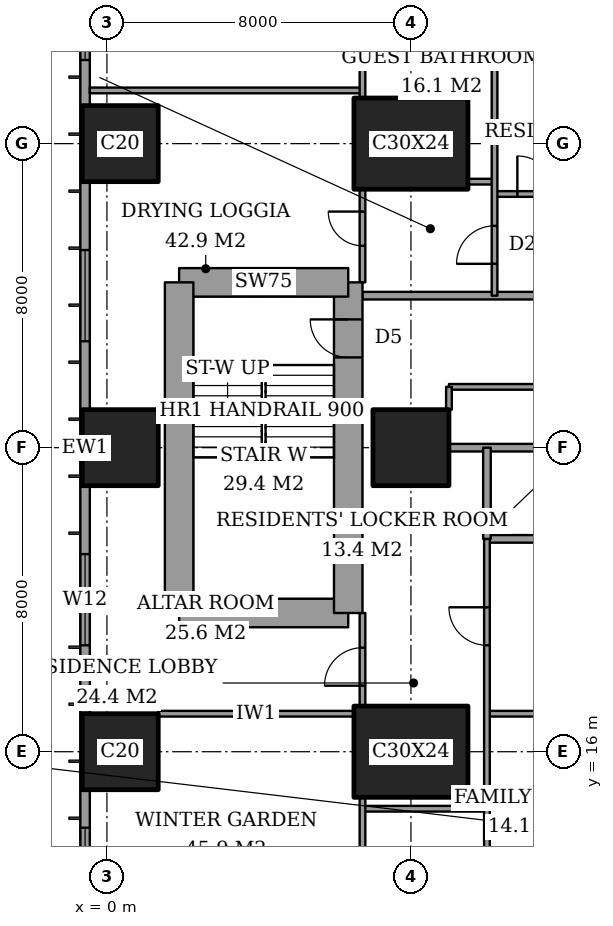
"""IFC4 building model, lengths in metres.
Left out: names, types, materials, properties, quantities, classifications, styles, units other than length and angle.
Written with IfcOpenShell. Run it as: python <this file> out.ifc"""

import sys

from ifc_helpers import new_model, si_unit, direction, frame, frame_2d, origin, origin_2d, place, context, subcontext, project, spatial, rectangle, extrude, element, fill, save


model = new_model("IFC4")
c1 = context("Model", 3, precision=1e-05, world=origin(), true_north=direction((0.0, 1.0)))
c2 = subcontext(c1, "Body", "Model", "MODEL_VIEW")
j1 = project(units=[si_unit("LENGTHUNIT", "METRE"), si_unit("PLANEANGLEUNIT", "RADIAN")], contexts=[c1])
p1 = place(None, origin())
s1 = spatial("IfcSite", under=j1, at=p1, CompositionType="ELEMENT")
p2 = place(p1, origin())
s2 = spatial("IfcBuilding", under=s1, at=p2, CompositionType="ELEMENT")
p3 = place(p2, frame((0.0, 0.0, 117.8)))
s3 = spatial("IfcBuildingStorey", under=s2, at=p3, CompositionType="ELEMENT", Elevation=117.8)
for number, where, z_axis, x_axis in (
    (1, (0.35, 16.0, 0.0), (0.0, 0.0, 1.0), (1.0, 0.0, 0.0)),
    (2, (0.35, 24.0, 0.0), (0.0, 0.0, 1.0), (1.0, 0.0, 0.0)),
    (3, (0.35, 32.0, 0.0), (0.0, 0.0, 1.0), (1.0, 0.0, 0.0)),
):
    element("IfcColumn", number, at=place(p3, frame(where, z_axis=z_axis, x_axis=x_axis)), inside=s3, PredefinedType="COLUMN", context=c2, shape_type="SweptSolid", body=[
        extrude(rectangle(XDim=2.0, YDim=2.0, at=origin_2d()), origin(), (0.0, 0.0, 1.0), 3.6),
    ])
p4 = place(p3, frame((8.0, 16.0, 0.0), z_axis=(0.0, 0.0, 1.0), x_axis=(1.0, 0.0, 0.0)))
e4 = element("IfcColumn", 4, at=p4, inside=s3, PredefinedType="COLUMN", context=c2, shape_type="SweptSolid", body=[
    extrude(rectangle(XDim=3.0, YDim=2.4, at=origin_2d()), origin(), (0.0, 0.0, 1.0), 3.6),
])
p5 = place(p3, frame((8.0, 24.0, 0.0), z_axis=(0.0, 0.0, 1.0), x_axis=(1.0, 0.0, 0.0)))
e5 = element("IfcColumn", 5, at=p5, inside=s3, PredefinedType="COLUMN", context=c2, shape_type="SweptSolid", body=[
    extrude(rectangle(XDim=2.0, YDim=2.0, at=origin_2d()), origin(), (0.0, 0.0, 1.0), 3.6),
])
p6 = place(p3, frame((8.0, 32.0, 0.0), z_axis=(0.0, 0.0, 1.0), x_axis=(1.0, 0.0, 0.0)))
e6 = element("IfcColumn", 6, at=p6, inside=s3, PredefinedType="COLUMN", context=c2, shape_type="SweptSolid", body=[
    extrude(rectangle(XDim=3.0, YDim=2.4, at=origin_2d()), origin(), (0.0, 0.0, 1.0), 3.6),
])
p7 = place(p3, frame((1.9, 19.65, 0.0), z_axis=(0.0, 0.0, 1.0), x_axis=(1.0, 0.0, 0.0)))
e7 = element("IfcWall", 7, at=p7, inside=s3, PredefinedType="SHEAR", context=c2, shape_type="SweptSolid", body=[
    extrude(rectangle(XDim=4.45, YDim=0.75, at=frame_2d((2.225, 0.0))), origin(), (0.0, 0.0, 1.0), 3.6),
])
p8 = place(p3, frame((6.35, 19.65, 0.0), z_axis=(0.0, 0.0, 1.0), x_axis=(0.0, 1.0, 0.0)))
e8 = element("IfcWall", 8, at=p8, inside=s3, PredefinedType="SHEAR", context=c2, shape_type="SweptSolid", body=[
    extrude(rectangle(XDim=8.7, YDim=0.75, at=frame_2d((4.35, 0.0))), origin(), (0.0, 0.0, 1.0), 3.6),
])
p9 = place(p8, frame((6.725, 0.0, 0.0)))
e9 = element("IfcOpeningElement", 9, at=p9, cuts=e8, PredefinedType="OPENING", context=c2, shape_type="SweptSolid", body=[
    extrude(rectangle(XDim=1.0, YDim=2.1, at=frame_2d((0.5, 1.05))), frame((0.0, 0.385, 0.0), z_axis=(0.0, -1.0, 0.0), x_axis=(1.0, 0.0, 0.0)), (0.0, 0.0, 1.0), 0.77),
])
p10 = place(p3, frame((6.35, 28.35, 0.0), z_axis=(0.0, 0.0, 1.0), x_axis=(-1.0, 0.0, 0.0)))
e10 = element("IfcWall", 10, at=p10, inside=s3, PredefinedType="SHEAR", context=c2, shape_type="SweptSolid", body=[
    extrude(rectangle(XDim=4.45, YDim=0.75, at=frame_2d((2.225, 0.0))), origin(), (0.0, 0.0, 1.0), 3.6),
])
p11 = place(p3, frame((1.9, 28.35, 0.0), z_axis=(0.0, 0.0, 1.0), x_axis=(0.0, -1.0, 0.0)))
e11 = element("IfcWall", 11, at=p11, inside=s3, PredefinedType="SHEAR", context=c2, shape_type="SweptSolid", body=[
    extrude(rectangle(XDim=8.7, YDim=0.75, at=frame_2d((4.35, 0.0))), origin(), (0.0, 0.0, 1.0), 3.6),
])
p12 = place(p3, frame((-0.575, 44.825, 0.0), z_axis=(0.0, 0.0, 1.0), x_axis=(0.0, -1.0, 0.0)))
e12 = element("IfcWall", 12, at=p12, inside=s3, PredefinedType="SOLIDWALL", context=c2, shape_type="SweptSolid", body=[
    extrude(rectangle(XDim=41.65, YDim=0.25, at=frame_2d((20.825, 0.0))), origin(), (0.0, 0.0, 1.0), 3.6),
])
p13 = place(p12, frame((0.775, 0.0, 0.4)))
e13 = element("IfcOpeningElement", 13, at=p13, cuts=e12, PredefinedType="OPENING", context=c2, shape_type="SweptSolid", body=[
    extrude(rectangle(XDim=2.4, YDim=2.2, at=frame_2d((1.2, 1.1))), frame((0.0, 0.135, 0.0), z_axis=(0.0, -1.0, 0.0), x_axis=(1.0, 0.0, 0.0)), (0.0, 0.0, 1.0), 0.27),
])
p14 = place(p12, frame((6.1, 0.0, 0.4)))
e14 = element("IfcOpeningElement", 14, at=p14, cuts=e12, PredefinedType="OPENING", context=c2, shape_type="SweptSolid", body=[
    extrude(rectangle(XDim=1.2, YDim=2.2, at=frame_2d((0.6, 1.1))), frame((0.0, 0.135, 0.0), z_axis=(0.0, -1.0, 0.0), x_axis=(1.0, 0.0, 0.0)), (0.0, 0.0, 1.0), 0.27),
])
p15 = place(p12, frame((8.225, 0.0, 0.4)))
e15 = element("IfcOpeningElement", 15, at=p15, cuts=e12, PredefinedType="OPENING", context=c2, shape_type="SweptSolid", body=[
    extrude(rectangle(XDim=2.4, YDim=2.2, at=frame_2d((1.2, 1.1))), frame((0.0, 0.135, 0.0), z_axis=(0.0, -1.0, 0.0), x_axis=(1.0, 0.0, 0.0)), (0.0, 0.0, 1.0), 0.27),
])
p16 = place(p12, frame((15.625, 0.0, 0.4)))
e16 = element("IfcOpeningElement", 16, at=p16, cuts=e12, PredefinedType="OPENING", context=c2, shape_type="SweptSolid", body=[
    extrude(rectangle(XDim=2.4, YDim=2.2, at=frame_2d((1.2, 1.1))), frame((0.0, 0.135, 0.0), z_axis=(0.0, -1.0, 0.0), x_axis=(1.0, 0.0, 0.0)), (0.0, 0.0, 1.0), 0.27),
])
p17 = place(p12, frame((23.625, 0.0, 0.4)))
e17 = element("IfcOpeningElement", 17, at=p17, cuts=e12, PredefinedType="OPENING", context=c2, shape_type="SweptSolid", body=[
    extrude(rectangle(XDim=2.4, YDim=2.2, at=frame_2d((1.2, 1.1))), frame((0.0, 0.135, 0.0), z_axis=(0.0, -1.0, 0.0), x_axis=(1.0, 0.0, 0.0)), (0.0, 0.0, 1.0), 0.27),
])
p18 = place(p12, frame((30.825, 0.0, 0.4)))
e18 = element("IfcOpeningElement", 18, at=p18, cuts=e12, PredefinedType="OPENING", context=c2, shape_type="SweptSolid", body=[
    extrude(rectangle(XDim=2.4, YDim=2.2, at=frame_2d((1.2, 1.1))), frame((0.0, 0.135, 0.0), z_axis=(0.0, -1.0, 0.0), x_axis=(1.0, 0.0, 0.0)), (0.0, 0.0, 1.0), 0.27),
])
p19 = place(p12, frame((34.5, 0.0, 0.4)))
e19 = element("IfcOpeningElement", 19, at=p19, cuts=e12, PredefinedType="OPENING", context=c2, shape_type="SweptSolid", body=[
    extrude(rectangle(XDim=1.2, YDim=2.2, at=frame_2d((0.6, 1.1))), frame((0.0, 0.135, 0.0), z_axis=(0.0, -1.0, 0.0), x_axis=(1.0, 0.0, 0.0)), (0.0, 0.0, 1.0), 0.27),
])
p20 = place(p12, frame((38.475, 0.0, 0.4)))
e20 = element("IfcOpeningElement", 20, at=p20, cuts=e12, PredefinedType="OPENING", context=c2, shape_type="SweptSolid", body=[
    extrude(rectangle(XDim=2.4, YDim=2.2, at=frame_2d((1.2, 1.1))), frame((0.0, 0.135, 0.0), z_axis=(0.0, -1.0, 0.0), x_axis=(1.0, 0.0, 0.0)), (0.0, 0.0, 1.0), 0.27),
])
p21 = place(p3, frame((6.725, 14.5, 0.0), z_axis=(0.0, 0.0, 1.0), x_axis=(1.0, 0.0, 0.0)))
e21 = element("IfcWall", 21, at=p21, inside=s3, PredefinedType="PARTITIONING", context=c2, shape_type="SweptSolid", body=[
    extrude(rectangle(XDim=3.275, YDim=0.15, at=frame_2d((1.637, 0.0))), origin(), (0.0, 0.0, 1.0), 3.35),
])
p22 = place(p3, frame((1.35, 17.0, 0.0), z_axis=(0.0, 0.0, 1.0), x_axis=(1.0, 0.0, 0.0)))
e22 = element("IfcWall", 22, at=p22, inside=s3, PredefinedType="PARTITIONING", context=c2, shape_type="SweptSolid", body=[
    extrude(rectangle(XDim=5.15, YDim=0.15, at=frame_2d((2.575, 0.0))), origin(), (0.0, 0.0, 1.0), 3.35),
])
p23 = place(p3, frame((10.0, 17.0, 0.0), z_axis=(0.0, 0.0, 1.0), x_axis=(1.0, 0.0, 0.0)))
e23 = element("IfcWall", 23, at=p23, inside=s3, PredefinedType="PARTITIONING", context=c2, shape_type="SweptSolid", body=[
    extrude(rectangle(XDim=4.4, YDim=0.15, at=frame_2d((2.2, 0.0))), origin(), (0.0, 0.0, 1.0), 3.35),
])
p24 = place(p23, frame((2.8, 0.0, 0.0)))
e24 = element("IfcOpeningElement", 24, at=p24, cuts=e23, PredefinedType="OPENING", context=c2, shape_type="SweptSolid", body=[
    extrude(rectangle(XDim=1.0, YDim=2.1, at=frame_2d((0.5, 1.05))), frame((0.0, 0.085, 0.0), z_axis=(0.0, -1.0, 0.0), x_axis=(1.0, 0.0, 0.0)), (0.0, 0.0, 1.0), 0.17),
])
p25 = place(p3, frame((10.0, 21.6, 0.0), z_axis=(0.0, 0.0, 1.0), x_axis=(1.0, 0.0, 0.0)))
e25 = element("IfcWall", 25, at=p25, inside=s3, PredefinedType="PARTITIONING", context=c2, shape_type="SweptSolid", body=[
    extrude(rectangle(XDim=4.8, YDim=0.2, at=frame_2d((2.4, 0.0))), origin(), (0.0, 0.0, 1.0), 3.35),
])
p26 = place(p25, frame((1.95, 0.0, 0.0)))
e26 = element("IfcOpeningElement", 26, at=p26, cuts=e25, PredefinedType="OPENING", context=c2, shape_type="SweptSolid", body=[
    extrude(rectangle(XDim=0.9, YDim=2.1, at=frame_2d((0.45, 1.05))), frame((0.0, 0.11, 0.0), z_axis=(0.0, -1.0, 0.0), x_axis=(1.0, 0.0, 0.0)), (0.0, 0.0, 1.0), 0.22),
])
p27 = place(p3, frame((9.0, 24.0, 0.0), z_axis=(0.0, 0.0, 1.0), x_axis=(1.0, 0.0, 0.0)))
e27 = element("IfcWall", 27, at=p27, inside=s3, PredefinedType="PARTITIONING", context=c2, shape_type="SweptSolid", body=[
    extrude(rectangle(XDim=6.0, YDim=0.2, at=frame_2d((3.0, 0.0))), origin(), (0.0, 0.0, 1.0), 3.35),
])
p28 = place(p3, frame((9.0, 25.6, 0.0), z_axis=(0.0, 0.0, 1.0), x_axis=(1.0, 0.0, 0.0)))
e28 = element("IfcWall", 28, at=p28, inside=s3, PredefinedType="PARTITIONING", context=c2, shape_type="SweptSolid", body=[
    extrude(rectangle(XDim=8.4, YDim=0.15, at=frame_2d((4.2, 0.0))), origin(), (0.0, 0.0, 1.0), 3.35),
])
p29 = place(p28, frame((3.75, 0.0, 0.0)))
e29 = element("IfcOpeningElement", 29, at=p29, cuts=e28, PredefinedType="OPENING", context=c2, shape_type="SweptSolid", body=[
    extrude(rectangle(XDim=0.9, YDim=2.1, at=frame_2d((0.45, 1.05))), frame((0.0, 0.085, 0.0), z_axis=(0.0, -1.0, 0.0), x_axis=(1.0, 0.0, 0.0)), (0.0, 0.0, 1.0), 0.17),
])
p30 = place(p3, frame((6.725, 28.0, 0.0), z_axis=(0.0, 0.0, 1.0), x_axis=(1.0, 0.0, 0.0)))
e30 = element("IfcWall", 30, at=p30, inside=s3, PredefinedType="PARTITIONING", context=c2, shape_type="SweptSolid", body=[
    extrude(rectangle(XDim=17.275, YDim=0.2, at=frame_2d((8.637, 0.0))), origin(), (0.0, 0.0, 1.0), 3.35),
])
p31 = place(p30, frame((6.775, 0.0, 0.0)))
e31 = element("IfcOpeningElement", 31, at=p31, cuts=e30, PredefinedType="OPENING", context=c2, shape_type="SweptSolid", body=[
    extrude(rectangle(XDim=1.2, YDim=2.4, at=frame_2d((0.6, 1.2))), frame((0.0, 0.11, 0.0), z_axis=(0.0, -1.0, 0.0), x_axis=(1.0, 0.0, 0.0)), (0.0, 0.0, 1.0), 0.22),
])
p32 = place(p3, frame((10.2, 30.675, 0.0), z_axis=(0.0, 0.0, 1.0), x_axis=(1.0, 0.0, 0.0)))
e32 = element("IfcWall", 32, at=p32, inside=s3, PredefinedType="PARTITIONING", context=c2, shape_type="SweptSolid", body=[
    extrude(rectangle(XDim=4.2, YDim=0.15, at=frame_2d((2.1, 0.0))), origin(), (0.0, 0.0, 1.0), 3.35),
])
p33 = place(p32, frame((0.6, 0.0, 0.0)))
e33 = element("IfcOpeningElement", 33, at=p33, cuts=e32, PredefinedType="OPENING", context=c2, shape_type="SweptSolid", body=[
    extrude(rectangle(XDim=1.0, YDim=2.1, at=frame_2d((0.5, 1.05))), frame((0.0, 0.085, 0.0), z_axis=(0.0, -1.0, 0.0), x_axis=(1.0, 0.0, 0.0)), (0.0, 0.0, 1.0), 0.17),
])
p34 = place(p3, frame((9.5, 31.0, 0.0), z_axis=(0.0, 0.0, 1.0), x_axis=(1.0, 0.0, 0.0)))
e34 = element("IfcWall", 34, at=p34, inside=s3, PredefinedType="PARTITIONING", context=c2, shape_type="SweptSolid", body=[
    extrude(rectangle(XDim=0.7, YDim=0.15, at=frame_2d((0.35, 0.0))), origin(), (0.0, 0.0, 1.0), 3.35),
])
p35 = place(p3, frame((-0.45, 33.4, 0.0), z_axis=(0.0, 0.0, 1.0), x_axis=(1.0, 0.0, 0.0)))
e35 = element("IfcWall", 35, at=p35, inside=s3, PredefinedType="PARTITIONING", context=c2, shape_type="SweptSolid", body=[
    extrude(rectangle(XDim=7.175, YDim=0.15, at=frame_2d((3.587, 0.0))), origin(), (0.0, 0.0, 1.0), 3.35),
])
p36 = place(p3, frame((6.725, 10.6, 0.0), z_axis=(0.0, 0.0, 1.0), x_axis=(0.0, 1.0, 0.0)))
e36 = element("IfcWall", 36, at=p36, inside=s3, PredefinedType="PARTITIONING", context=c2, shape_type="SweptSolid", body=[
    extrude(rectangle(XDim=4.2, YDim=0.15, at=frame_2d((2.1, 0.0))), origin(), (0.0, 0.0, 1.0), 3.35),
])
p37 = place(p3, frame((6.725, 17.2, 0.0), z_axis=(0.0, 0.0, 1.0), x_axis=(0.0, 1.0, 0.0)))
e37 = element("IfcWall", 37, at=p37, inside=s3, PredefinedType="PARTITIONING", context=c2, shape_type="SweptSolid", body=[
    extrude(rectangle(XDim=2.45, YDim=0.15, at=frame_2d((1.225, 0.0))), origin(), (0.0, 0.0, 1.0), 3.35),
])
p38 = place(p37, frame((0.538, 0.0, 0.0)))
e38 = element("IfcOpeningElement", 38, at=p38, cuts=e37, PredefinedType="OPENING", context=c2, shape_type="SweptSolid", body=[
    extrude(rectangle(XDim=1.0, YDim=2.1, at=frame_2d((0.5, 1.05))), frame((0.0, 0.085, 0.0), z_axis=(0.0, -1.0, 0.0), x_axis=(1.0, 0.0, 0.0)), (0.0, 0.0, 1.0), 0.17),
])
p39 = place(p3, frame((6.725, 28.35, 0.0), z_axis=(0.0, 0.0, 1.0), x_axis=(0.0, 1.0, 0.0)))
e39 = element("IfcWall", 39, at=p39, inside=s3, PredefinedType="PARTITIONING", context=c2, shape_type="SweptSolid", body=[
    extrude(rectangle(XDim=2.45, YDim=0.15, at=frame_2d((1.225, 0.0))), origin(), (0.0, 0.0, 1.0), 3.35),
])
p40 = place(p39, frame((0.962, 0.0, 0.0)))
e40 = element("IfcOpeningElement", 40, at=p40, cuts=e39, PredefinedType="OPENING", context=c2, shape_type="SweptSolid", body=[
    extrude(rectangle(XDim=0.9, YDim=2.1, at=frame_2d((0.45, 1.05))), frame((0.0, 0.085, 0.0), z_axis=(0.0, -1.0, 0.0), x_axis=(1.0, 0.0, 0.0)), (0.0, 0.0, 1.0), 0.17),
])
p41 = place(p3, frame((6.725, 33.2, 0.0), z_axis=(0.0, 0.0, 1.0), x_axis=(0.0, 1.0, 0.0)))
e41 = element("IfcWall", 41, at=p41, inside=s3, PredefinedType="PARTITIONING", context=c2, shape_type="SweptSolid", body=[
    extrude(rectangle(XDim=4.2, YDim=0.15, at=frame_2d((2.1, 0.0))), origin(), (0.0, 0.0, 1.0), 3.35),
])
p42 = place(p3, frame((9.0, 25.0, 0.0), z_axis=(0.0, 0.0, 1.0), x_axis=(0.0, 1.0, 0.0)))
e42 = element("IfcWall", 42, at=p42, inside=s3, PredefinedType="PARTITIONING", context=c2, shape_type="SweptSolid", body=[
    extrude(rectangle(XDim=0.6, YDim=0.15, at=frame_2d((0.3, 0.0))), origin(), (0.0, 0.0, 1.0), 3.35),
])
p43 = place(p3, frame((10.0, 21.6, 0.0), z_axis=(0.0, 0.0, 1.0), x_axis=(0.0, 1.0, 0.0)))
e43 = element("IfcWall", 43, at=p43, inside=s3, PredefinedType="PARTITIONING", context=c2, shape_type="SweptSolid", body=[
    extrude(rectangle(XDim=2.4, YDim=0.2, at=frame_2d((1.2, 0.0))), origin(), (0.0, 0.0, 1.0), 3.35),
])
p44 = place(p3, frame((10.0, 10.6, 0.0), z_axis=(0.0, 0.0, 1.0), x_axis=(0.0, 1.0, 0.0)))
e44 = element("IfcWall", 44, at=p44, inside=s3, PredefinedType="PARTITIONING", context=c2, shape_type="SweptSolid", body=[
    extrude(rectangle(XDim=11.0, YDim=0.15, at=frame_2d((5.5, 0.0))), origin(), (0.0, 0.0, 1.0), 3.35),
])
p45 = place(p44, frame((8.2, 0.0, 0.0)))
e45 = element("IfcOpeningElement", 45, at=p45, cuts=e44, PredefinedType="OPENING", context=c2, shape_type="SweptSolid", body=[
    extrude(rectangle(XDim=1.0, YDim=2.1, at=frame_2d((0.5, 1.05))), frame((0.0, 0.085, 0.0), z_axis=(0.0, -1.0, 0.0), x_axis=(1.0, 0.0, 0.0)), (0.0, 0.0, 1.0), 0.17),
])
p46 = place(p3, frame((10.2, 28.0, 0.0), z_axis=(0.0, 0.0, 1.0), x_axis=(0.0, 1.0, 0.0)))
e46 = element("IfcWall", 46, at=p46, inside=s3, PredefinedType="PARTITIONING", context=c2, shape_type="SweptSolid", body=[
    extrude(rectangle(XDim=9.4, YDim=0.15, at=frame_2d((4.7, 0.0))), origin(), (0.0, 0.0, 1.0), 3.35),
])
p47 = place(p46, frame((0.837, 0.0, 0.0)))
e47 = element("IfcOpeningElement", 47, at=p47, cuts=e46, PredefinedType="OPENING", context=c2, shape_type="SweptSolid", body=[
    extrude(rectangle(XDim=1.0, YDim=2.1, at=frame_2d((0.5, 1.05))), frame((0.0, 0.085, 0.0), z_axis=(0.0, -1.0, 0.0), x_axis=(1.0, 0.0, 0.0)), (0.0, 0.0, 1.0), 0.17),
])
p48 = place(p15, origin())
e48 = element("IfcWindow", 48, at=p48, inside=s3, PartitioningType="SINGLE_PANEL", PredefinedType="WINDOW", context=c2, shape_type="SweptSolid", body=[
    extrude(rectangle(XDim=2.4, YDim=2.2, at=frame_2d((1.2, 1.1))), frame((0.0, 0.03, 0.0), z_axis=(0.0, -1.0, 0.0), x_axis=(1.0, 0.0, 0.0)), (0.0, 0.0, 1.0), 0.06),
])
fill(e15, e48)
p49 = place(p16, origin())
e49 = element("IfcWindow", 49, at=p49, inside=s3, PartitioningType="SINGLE_PANEL", PredefinedType="WINDOW", context=c2, shape_type="SweptSolid", body=[
    extrude(rectangle(XDim=2.4, YDim=2.2, at=frame_2d((1.2, 1.1))), frame((0.0, 0.03, 0.0), z_axis=(0.0, -1.0, 0.0), x_axis=(1.0, 0.0, 0.0)), (0.0, 0.0, 1.0), 0.06),
])
fill(e16, e49)
p50 = place(p17, origin())
e50 = element("IfcWindow", 50, at=p50, inside=s3, PartitioningType="SINGLE_PANEL", PredefinedType="WINDOW", context=c2, shape_type="SweptSolid", body=[
    extrude(rectangle(XDim=2.4, YDim=2.2, at=frame_2d((1.2, 1.1))), frame((0.0, 0.03, 0.0), z_axis=(0.0, -1.0, 0.0), x_axis=(1.0, 0.0, 0.0)), (0.0, 0.0, 1.0), 0.06),
])
fill(e17, e50)
p51 = place(p18, origin())
e51 = element("IfcWindow", 51, at=p51, inside=s3, PartitioningType="SINGLE_PANEL", PredefinedType="WINDOW", context=c2, shape_type="SweptSolid", body=[
    extrude(rectangle(XDim=2.4, YDim=2.2, at=frame_2d((1.2, 1.1))), frame((0.0, 0.03, 0.0), z_axis=(0.0, -1.0, 0.0), x_axis=(1.0, 0.0, 0.0)), (0.0, 0.0, 1.0), 0.06),
])
fill(e18, e51)
p52 = place(p38, origin())
e52 = element("IfcDoor", 52, at=p52, inside=s3, OperationType="SINGLE_SWING_RIGHT", PredefinedType="DOOR", context=c2, shape_type="SweptSolid", body=[
    extrude(rectangle(XDim=1.0, YDim=2.1, at=frame_2d((0.5, 1.05))), frame((0.0, 0.025, 0.0), z_axis=(0.0, -1.0, 0.0), x_axis=(1.0, 0.0, 0.0)), (0.0, 0.0, 1.0), 0.05),
])
fill(e38, e52)
p53 = place(p45, origin())
e53 = element("IfcDoor", 53, at=p53, inside=s3, OperationType="SINGLE_SWING_LEFT", PredefinedType="DOOR", context=c2, shape_type="SweptSolid", body=[
    extrude(rectangle(XDim=1.0, YDim=2.1, at=frame_2d((0.5, 1.05))), frame((0.0, 0.025, 0.0), z_axis=(0.0, -1.0, 0.0), x_axis=(1.0, 0.0, 0.0)), (0.0, 0.0, 1.0), 0.05),
])
fill(e45, e53)
p54 = place(p40, origin())
e54 = element("IfcDoor", 54, at=p54, inside=s3, OperationType="SINGLE_SWING_LEFT", PredefinedType="DOOR", context=c2, shape_type="SweptSolid", body=[
    extrude(rectangle(XDim=0.9, YDim=2.1, at=frame_2d((0.45, 1.05))), frame((0.0, 0.025, 0.0), z_axis=(0.0, -1.0, 0.0), x_axis=(1.0, 0.0, 0.0)), (0.0, 0.0, 1.0), 0.05),
])
fill(e40, e54)
p55 = place(p47, origin())
e55 = element("IfcDoor", 55, at=p55, inside=s3, OperationType="SINGLE_SWING_RIGHT", PredefinedType="DOOR", context=c2, shape_type="SweptSolid", body=[
    extrude(rectangle(XDim=1.0, YDim=2.1, at=frame_2d((0.5, 1.05))), frame((0.0, 0.025, 0.0), z_axis=(0.0, -1.0, 0.0), x_axis=(1.0, 0.0, 0.0)), (0.0, 0.0, 1.0), 0.05),
])
fill(e47, e55)
p56 = place(p33, origin())
e56 = element("IfcDoor", 56, at=p56, inside=s3, OperationType="SINGLE_SWING_RIGHT", PredefinedType="DOOR", context=c2, shape_type="SweptSolid", body=[
    extrude(rectangle(XDim=1.0, YDim=2.1, at=frame_2d((0.5, 1.05))), frame((0.0, 0.025, 0.0), z_axis=(0.0, -1.0, 0.0), x_axis=(1.0, 0.0, 0.0)), (0.0, 0.0, 1.0), 0.05),
])
fill(e33, e56)
p57 = place(p9, origin())
e57 = element("IfcDoor", 57, at=p57, inside=s3, OperationType="SINGLE_SWING_LEFT", PredefinedType="DOOR", context=c2, shape_type="SweptSolid", body=[
    extrude(rectangle(XDim=1.0, YDim=2.1, at=frame_2d((0.5, 1.05))), frame((0.0, 0.025, 0.0), z_axis=(0.0, -1.0, 0.0), x_axis=(1.0, 0.0, 0.0)), (0.0, 0.0, 1.0), 0.05),
])
fill(e9, e57)
save(model, sys.argv[1])
